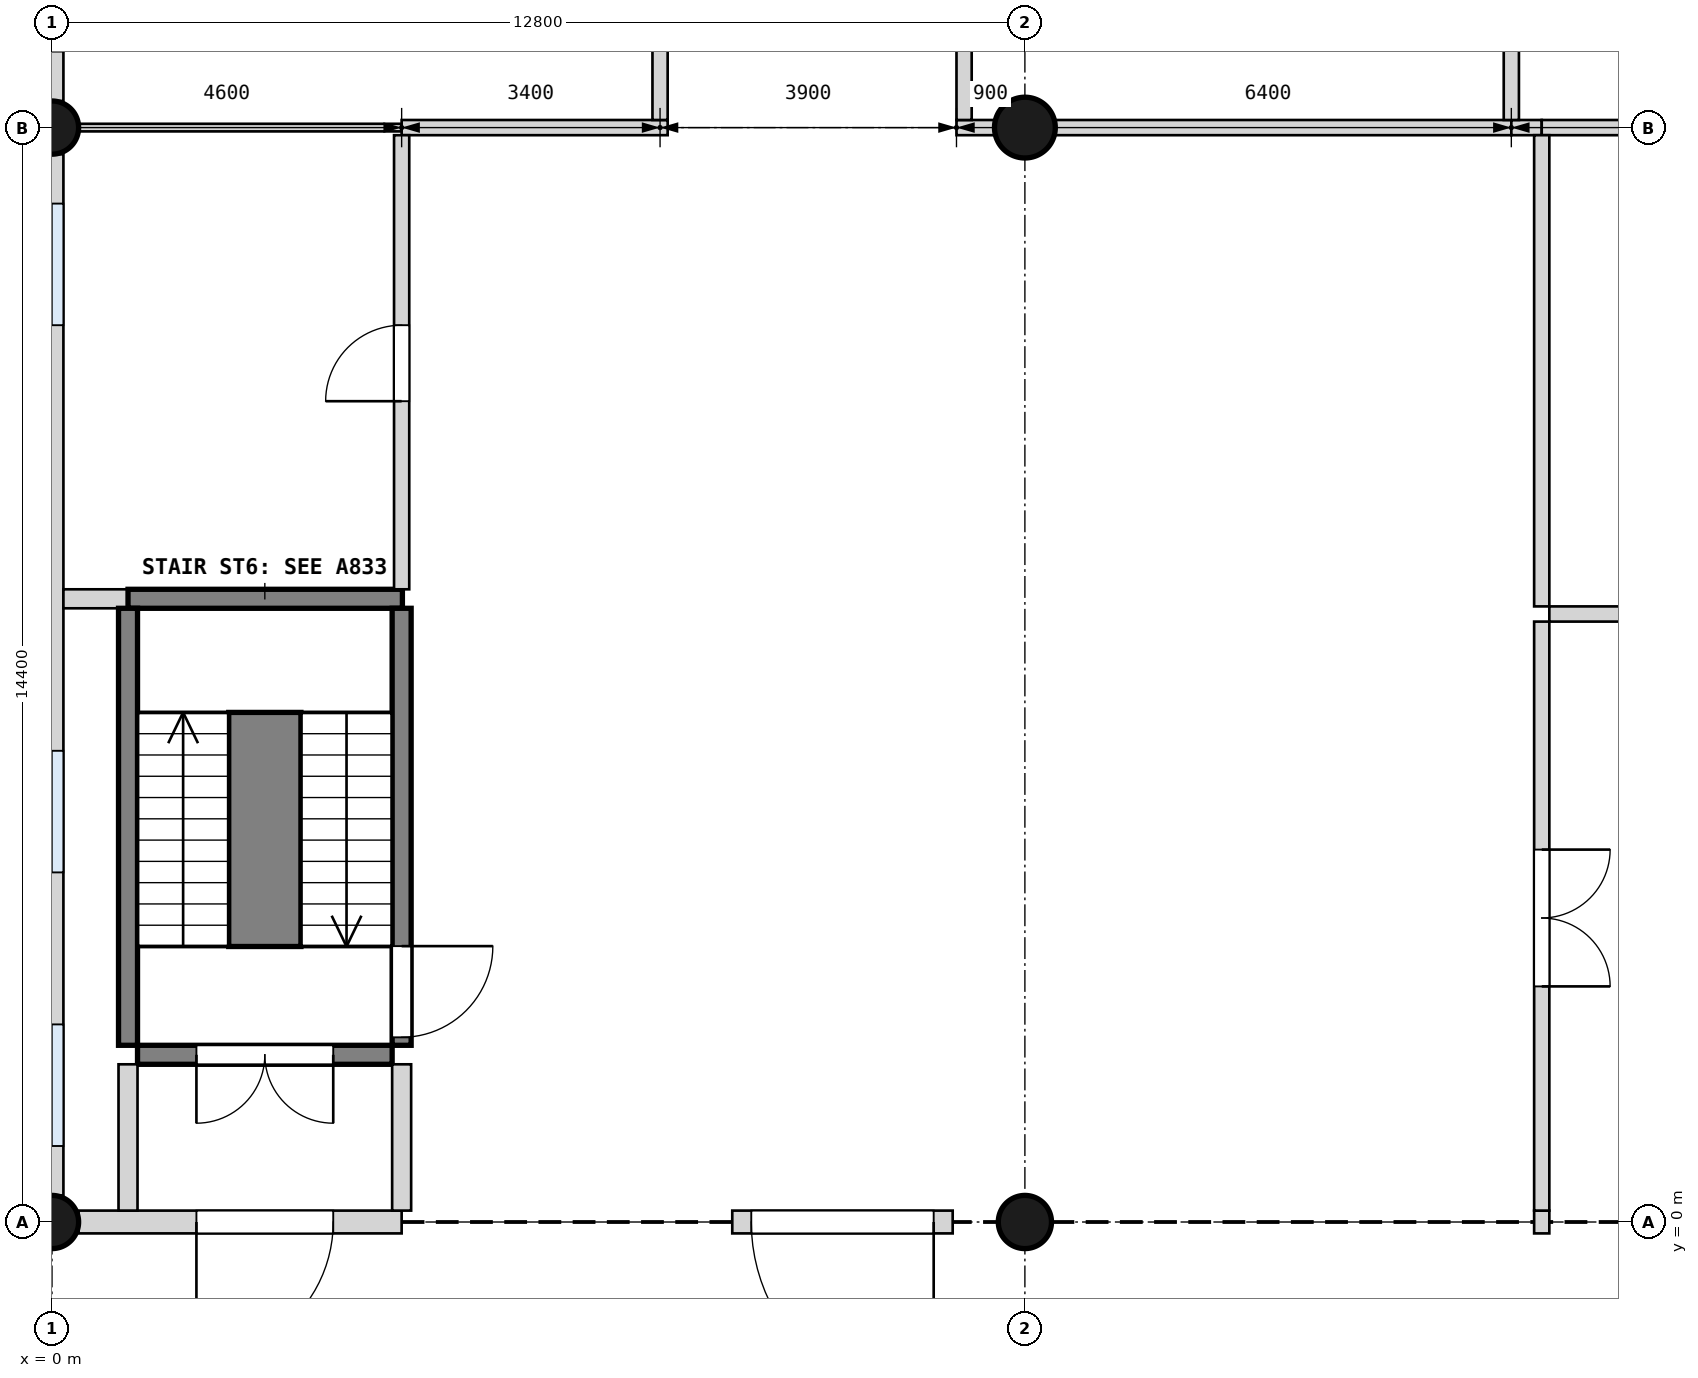
"""IFC4 building model, lengths in metres.
Left out: names, types, materials, properties, quantities, classifications, styles, units other than length and angle.
Written with IfcOpenShell. Run it as: python <this file> out.ifc"""

import sys

from ifc_helpers import new_model, si_unit, direction, frame, frame_2d, origin, origin_2d, place, context, subcontext, project, spatial, rectangle, circle, extrude, element, fill, save


model = new_model("IFC4")
c1 = context("Model", 3, precision=1e-05, world=origin(), true_north=direction((0.0, 1.0)))
c2 = subcontext(c1, "Body", "Model", "MODEL_VIEW")
j1 = project(units=[si_unit("LENGTHUNIT", "METRE"), si_unit("PLANEANGLEUNIT", "RADIAN")], contexts=[c1])
p1 = place(None, origin())
s1 = spatial("IfcSite", under=j1, at=p1, CompositionType="ELEMENT")
p2 = place(p1, origin())
s2 = spatial("IfcBuilding", under=s1, at=p2, CompositionType="ELEMENT")
p3 = place(p2, origin())
s3 = spatial("IfcBuildingStorey", under=s2, at=p3, CompositionType="ELEMENT", Elevation=0.0)
for number, where, z_axis, x_axis in (
    (1, (0.0, 0.0, 0.0), (0.0, 0.0, 1.0), (1.0, 0.0, 0.0)),
    (2, (0.0, 14.4, 0.0), (0.0, 0.0, 1.0), (1.0, 0.0, 0.0)),
    (3, (12.8, 0.0, 0.0), (0.0, 0.0, 1.0), (1.0, 0.0, 0.0)),
):
    element("IfcColumn", number, at=place(p3, frame(where, z_axis=z_axis, x_axis=x_axis)), inside=s3, PredefinedType="COLUMN", context=c2, shape_type="SweptSolid", body=[
        extrude(circle(Radius=0.35, at=origin_2d()), origin(), (0.0, 0.0, 1.0), 4.2),
    ])
p4 = place(p3, frame((12.8, 14.4, 0.0), z_axis=(0.0, 0.0, 1.0), x_axis=(1.0, 0.0, 0.0)))
e4 = element("IfcColumn", 4, at=p4, inside=s3, PredefinedType="COLUMN", context=c2, shape_type="SweptSolid", body=[
    extrude(circle(Radius=0.4, at=origin_2d()), origin(), (0.0, 0.0, 1.0), 4.2),
])
p5 = place(p3, frame((0.35, 0.0, 0.0), z_axis=(0.0, 0.0, 1.0), x_axis=(1.0, 0.0, 0.0)))
e5 = element("IfcWall", 5, at=p5, inside=s3, PredefinedType="SOLIDWALL", context=c2, shape_type="SweptSolid", body=[
    extrude(rectangle(XDim=4.25, YDim=0.3, at=frame_2d((2.125, 0.0))), origin(), (0.0, 0.0, 1.0), 3.0),
])
p6 = place(p5, frame((1.55, 0.0, 0.0)))
e6 = element("IfcOpeningElement", 6, at=p6, cuts=e5, PredefinedType="OPENING", context=c2, shape_type="SweptSolid", body=[
    extrude(rectangle(XDim=1.8, YDim=2.1, at=frame_2d((0.9, 1.05))), frame((0.0, 0.16, 0.0), z_axis=(0.0, -1.0, 0.0), x_axis=(1.0, 0.0, 0.0)), (0.0, 0.0, 1.0), 0.32),
])
p7 = place(p3, frame((8.95, 0.0, 0.0), z_axis=(0.0, 0.0, 1.0), x_axis=(1.0, 0.0, 0.0)))
e7 = element("IfcWall", 7, at=p7, inside=s3, PredefinedType="SOLIDWALL", context=c2, shape_type="SweptSolid", body=[
    extrude(rectangle(XDim=2.9, YDim=0.3, at=frame_2d((1.45, 0.0))), origin(), (0.0, 0.0, 1.0), 3.0),
])
p8 = place(p7, frame((0.25, 0.0, 0.0)))
e8 = element("IfcOpeningElement", 8, at=p8, cuts=e7, PredefinedType="OPENING", context=c2, shape_type="SweptSolid", body=[
    extrude(rectangle(XDim=2.4, YDim=2.4, at=frame_2d((1.2, 1.2))), frame((0.0, 0.16, 0.0), z_axis=(0.0, -1.0, 0.0), x_axis=(1.0, 0.0, 0.0)), (0.0, 0.0, 1.0), 0.32),
])
p9 = place(p3, frame((19.5, 0.0, 0.0), z_axis=(0.0, 0.0, 1.0), x_axis=(1.0, 0.0, 0.0)))
e9 = element("IfcWall", 9, at=p9, inside=s3, PredefinedType="SOLIDWALL", context=c2, shape_type="SweptSolid", body=[
    extrude(rectangle(XDim=0.2, YDim=0.3, at=frame_2d((0.1, 0.0))), origin(), (0.0, 0.0, 1.0), 3.0),
])
p10 = place(p3, frame((0.0, 0.35, 0.0), z_axis=(0.0, 0.0, 1.0), x_axis=(0.0, 1.0, 0.0)))
e10 = element("IfcWall", 10, at=p10, inside=s3, PredefinedType="SOLIDWALL", context=c2, shape_type="SweptSolid", body=[
    extrude(rectangle(XDim=13.7, YDim=0.3, at=frame_2d((6.85, 0.0))), origin(), (0.0, 0.0, 1.0), 3.0),
])
p11 = place(p10, frame((0.65, 0.0, 0.3)))
e11 = element("IfcOpeningElement", 11, at=p11, cuts=e10, PredefinedType="OPENING", context=c2, shape_type="SweptSolid", body=[
    extrude(rectangle(XDim=1.6, YDim=2.4, at=frame_2d((0.8, 1.2))), frame((0.0, 0.16, 0.0), z_axis=(0.0, -1.0, 0.0), x_axis=(1.0, 0.0, 0.0)), (0.0, 0.0, 1.0), 0.32),
])
p12 = place(p10, frame((4.25, 0.0, 0.3)))
e12 = element("IfcOpeningElement", 12, at=p12, cuts=e10, PredefinedType="OPENING", context=c2, shape_type="SweptSolid", body=[
    extrude(rectangle(XDim=1.6, YDim=2.4, at=frame_2d((0.8, 1.2))), frame((0.0, 0.16, 0.0), z_axis=(0.0, -1.0, 0.0), x_axis=(1.0, 0.0, 0.0)), (0.0, 0.0, 1.0), 0.32),
])
p13 = place(p10, frame((11.45, 0.0, 0.3)))
e13 = element("IfcOpeningElement", 13, at=p13, cuts=e10, PredefinedType="OPENING", context=c2, shape_type="SweptSolid", body=[
    extrude(rectangle(XDim=1.6, YDim=2.4, at=frame_2d((0.8, 1.2))), frame((0.0, 0.16, 0.0), z_axis=(0.0, -1.0, 0.0), x_axis=(1.0, 0.0, 0.0)), (0.0, 0.0, 1.0), 0.32),
])
p14 = place(p3, frame((0.0, 14.75, 0.0), z_axis=(0.0, 0.0, 1.0), x_axis=(0.0, 1.0, 0.0)))
e14 = element("IfcWall", 14, at=p14, inside=s3, PredefinedType="SOLIDWALL", context=c2, shape_type="SweptSolid", body=[
    extrude(rectangle(XDim=13.7, YDim=0.3, at=frame_2d((6.85, 0.0))), origin(), (0.0, 0.0, 1.0), 3.0),
])
p15 = place(p14, frame((0.65, 0.0, 0.3)))
e15 = element("IfcOpeningElement", 15, at=p15, cuts=e14, PredefinedType="OPENING", context=c2, shape_type="SweptSolid", body=[
    extrude(rectangle(XDim=1.6, YDim=2.4, at=frame_2d((0.8, 1.2))), frame((0.0, 0.16, 0.0), z_axis=(0.0, -1.0, 0.0), x_axis=(1.0, 0.0, 0.0)), (0.0, 0.0, 1.0), 0.32),
])
p16 = place(p14, frame((4.25, 0.0, 0.3)))
e16 = element("IfcOpeningElement", 16, at=p16, cuts=e14, PredefinedType="OPENING", context=c2, shape_type="SweptSolid", body=[
    extrude(rectangle(XDim=1.6, YDim=2.4, at=frame_2d((0.8, 1.2))), frame((0.0, 0.16, 0.0), z_axis=(0.0, -1.0, 0.0), x_axis=(1.0, 0.0, 0.0)), (0.0, 0.0, 1.0), 0.32),
])
p17 = place(p14, frame((11.45, 0.0, 0.3)))
e17 = element("IfcOpeningElement", 17, at=p17, cuts=e14, PredefinedType="OPENING", context=c2, shape_type="SweptSolid", body=[
    extrude(rectangle(XDim=1.6, YDim=2.4, at=frame_2d((0.8, 1.2))), frame((0.0, 0.16, 0.0), z_axis=(0.0, -1.0, 0.0), x_axis=(1.0, 0.0, 0.0)), (0.0, 0.0, 1.0), 0.32),
])
p18 = place(p3, frame((1.125, 2.2, 0.0), z_axis=(0.0, 0.0, 1.0), x_axis=(1.0, 0.0, 0.0)))
e18 = element("IfcWall", 18, at=p18, inside=s3, PredefinedType="SHEAR", context=c2, shape_type="SweptSolid", body=[
    extrude(rectangle(XDim=3.35, YDim=0.25, at=frame_2d((1.675, 0.0))), origin(), (0.0, 0.0, 1.0), 3.9),
])
p19 = place(p18, frame((0.775, 0.0, 0.0)))
e19 = element("IfcOpeningElement", 19, at=p19, cuts=e18, PredefinedType="OPENING", context=c2, shape_type="SweptSolid", body=[
    extrude(rectangle(XDim=1.8, YDim=2.1, at=frame_2d((0.9, 1.05))), frame((0.0, 0.135, 0.0), z_axis=(0.0, -1.0, 0.0), x_axis=(1.0, 0.0, 0.0)), (0.0, 0.0, 1.0), 0.27),
])
p20 = place(p3, frame((19.7, 8.0, 0.0), z_axis=(0.0, 0.0, 1.0), x_axis=(1.0, 0.0, 0.0)))
e20 = element("IfcWall", 20, at=p20, inside=s3, PredefinedType="PARTITIONING", context=c2, shape_type="SweptSolid", body=[
    extrude(rectangle(XDim=5.75, YDim=0.2, at=frame_2d((2.875, 0.0))), origin(), (0.0, 0.0, 1.0), 3.9),
])
p21 = place(p20, frame((2.4, 0.0, 0.0)))
e21 = element("IfcOpeningElement", 21, at=p21, cuts=e20, PredefinedType="OPENING", context=c2, shape_type="SweptSolid", body=[
    extrude(rectangle(XDim=1.0, YDim=2.1, at=frame_2d((0.5, 1.05))), frame((0.0, 0.11, 0.0), z_axis=(0.0, -1.0, 0.0), x_axis=(1.0, 0.0, 0.0)), (0.0, 0.0, 1.0), 0.22),
])
p22 = place(p3, frame((0.15, 8.2, 0.0), z_axis=(0.0, 0.0, 1.0), x_axis=(1.0, 0.0, 0.0)))
e22 = element("IfcWall", 22, at=p22, inside=s3, PredefinedType="PARTITIONING", context=c2, shape_type="SweptSolid", body=[
    extrude(rectangle(XDim=0.85, YDim=0.25, at=frame_2d((0.425, 0.0))), origin(), (0.0, 0.0, 1.0), 3.9),
])
p23 = place(p3, frame((1.0, 8.2, 0.0), z_axis=(0.0, 0.0, 1.0), x_axis=(1.0, 0.0, 0.0)))
e23 = element("IfcWall", 23, at=p23, inside=s3, PredefinedType="SHEAR", context=c2, shape_type="SweptSolid", body=[
    extrude(rectangle(XDim=3.61, YDim=0.25, at=frame_2d((1.805, 0.0))), origin(), (0.0, 0.0, 1.0), 3.9),
])
p24 = place(p3, frame((0.32, 14.4, 0.0), z_axis=(0.0, 0.0, 1.0), x_axis=(1.0, 0.0, 0.0)))
e24 = element("IfcWall", 24, at=p24, inside=s3, PredefinedType="PARTITIONING", context=c2, shape_type="SweptSolid", body=[
    extrude(rectangle(XDim=4.28, YDim=0.1, at=frame_2d((2.14, 0.0))), origin(), (0.0, 0.0, 1.0), 3.1),
])
p25 = place(p3, frame((4.6, 14.4, 0.0), z_axis=(0.0, 0.0, 1.0), x_axis=(1.0, 0.0, 0.0)))
e25 = element("IfcWall", 25, at=p25, inside=s3, PredefinedType="PARTITIONING", context=c2, shape_type="SweptSolid", body=[
    extrude(rectangle(XDim=3.5, YDim=0.2, at=frame_2d((1.75, 0.0))), origin(), (0.0, 0.0, 1.0), 3.1),
])
p26 = place(p3, frame((11.9, 14.4, 0.0), z_axis=(0.0, 0.0, 1.0), x_axis=(1.0, 0.0, 0.0)))
e26 = element("IfcWall", 26, at=p26, inside=s3, PredefinedType="PARTITIONING", context=c2, shape_type="SweptSolid", body=[
    extrude(rectangle(XDim=0.5, YDim=0.2, at=frame_2d((0.25, 0.0))), origin(), (0.0, 0.0, 1.0), 3.1),
])
p27 = place(p3, frame((13.2, 14.4, 0.0), z_axis=(0.0, 0.0, 1.0), x_axis=(1.0, 0.0, 0.0)))
e27 = element("IfcWall", 27, at=p27, inside=s3, PredefinedType="PARTITIONING", context=c2, shape_type="SweptSolid", body=[
    extrude(rectangle(XDim=6.0, YDim=0.2, at=frame_2d((3.0, 0.0))), origin(), (0.0, 0.0, 1.0), 3.1),
])
p28 = place(p3, frame((19.2, 14.4, 0.0), z_axis=(0.0, 0.0, 1.0), x_axis=(1.0, 0.0, 0.0)))
e28 = element("IfcWall", 28, at=p28, inside=s3, PredefinedType="PARTITIONING", context=c2, shape_type="SweptSolid", body=[
    extrude(rectangle(XDim=0.4, YDim=0.2, at=frame_2d((0.2, 0.0))), origin(), (0.0, 0.0, 1.0), 3.1),
])
p29 = place(p3, frame((19.6, 14.4, 0.0), z_axis=(0.0, 0.0, 1.0), x_axis=(1.0, 0.0, 0.0)))
e29 = element("IfcWall", 29, at=p29, inside=s3, PredefinedType="PARTITIONING", context=c2, shape_type="SweptSolid", body=[
    extrude(rectangle(XDim=5.68, YDim=0.2, at=frame_2d((2.84, 0.0))), origin(), (0.0, 0.0, 1.0), 3.1),
])
p30 = place(p3, frame((1.0, 0.15, 0.0), z_axis=(0.0, 0.0, 1.0), x_axis=(0.0, 1.0, 0.0)))
e30 = element("IfcWall", 30, at=p30, inside=s3, PredefinedType="PARTITIONING", context=c2, shape_type="SweptSolid", body=[
    extrude(rectangle(XDim=1.925, YDim=0.25, at=frame_2d((0.962, 0.0))), origin(), (0.0, 0.0, 1.0), 3.9),
])
p31 = place(p3, frame((1.0, 2.325, 0.0), z_axis=(0.0, 0.0, 1.0), x_axis=(0.0, 1.0, 0.0)))
e31 = element("IfcWall", 31, at=p31, inside=s3, PredefinedType="SHEAR", context=c2, shape_type="SweptSolid", body=[
    extrude(rectangle(XDim=5.75, YDim=0.25, at=frame_2d((2.875, 0.0))), origin(), (0.0, 0.0, 1.0), 3.9),
])
p32 = place(p3, frame((4.6, 0.15, 0.0), z_axis=(0.0, 0.0, 1.0), x_axis=(0.0, 1.0, 0.0)))
e32 = element("IfcWall", 32, at=p32, inside=s3, PredefinedType="PARTITIONING", context=c2, shape_type="SweptSolid", body=[
    extrude(rectangle(XDim=1.925, YDim=0.25, at=frame_2d((0.962, 0.0))), origin(), (0.0, 0.0, 1.0), 3.9),
])
p33 = place(p3, frame((4.6, 2.325, 0.0), z_axis=(0.0, 0.0, 1.0), x_axis=(0.0, 1.0, 0.0)))
e33 = element("IfcWall", 33, at=p33, inside=s3, PredefinedType="SHEAR", context=c2, shape_type="SweptSolid", body=[
    extrude(rectangle(XDim=5.75, YDim=0.25, at=frame_2d((2.875, 0.0))), origin(), (0.0, 0.0, 1.0), 3.9),
])
p34 = place(p33, frame((0.105, 0.0, 0.0)))
e34 = element("IfcOpeningElement", 34, at=p34, cuts=e33, PredefinedType="OPENING", context=c2, shape_type="SweptSolid", body=[
    extrude(rectangle(XDim=1.2, YDim=2.1, at=frame_2d((0.6, 1.05))), frame((0.0, 0.135, 0.0), z_axis=(0.0, -1.0, 0.0), x_axis=(1.0, 0.0, 0.0)), (0.0, 0.0, 1.0), 0.27),
])
p35 = place(p3, frame((4.6, 8.325, 0.0), z_axis=(0.0, 0.0, 1.0), x_axis=(0.0, 1.0, 0.0)))
e35 = element("IfcWall", 35, at=p35, inside=s3, PredefinedType="PARTITIONING", context=c2, shape_type="SweptSolid", body=[
    extrude(rectangle(XDim=5.975, YDim=0.2, at=frame_2d((2.988, 0.0))), origin(), (0.0, 0.0, 1.0), 3.9),
])
p36 = place(p35, frame((2.475, 0.0, 0.0)))
e36 = element("IfcOpeningElement", 36, at=p36, cuts=e35, PredefinedType="OPENING", context=c2, shape_type="SweptSolid", body=[
    extrude(rectangle(XDim=1.0, YDim=2.1, at=frame_2d((0.5, 1.05))), frame((0.0, 0.11, 0.0), z_axis=(0.0, -1.0, 0.0), x_axis=(1.0, 0.0, 0.0)), (0.0, 0.0, 1.0), 0.22),
])
p37 = place(p3, frame((8.0, 14.5, 0.0), z_axis=(0.0, 0.0, 1.0), x_axis=(0.0, 1.0, 0.0)))
e37 = element("IfcWall", 37, at=p37, inside=s3, PredefinedType="PARTITIONING", context=c2, shape_type="SweptSolid", body=[
    extrude(rectangle(XDim=7.8, YDim=0.2, at=frame_2d((3.9, 0.0))), origin(), (0.0, 0.0, 1.0), 3.9),
])
p38 = place(p37, frame((3.4, 0.0, 0.0)))
e38 = element("IfcOpeningElement", 38, at=p38, cuts=e37, PredefinedType="OPENING", context=c2, shape_type="SweptSolid", body=[
    extrude(rectangle(XDim=1.0, YDim=2.1, at=frame_2d((0.5, 1.05))), frame((0.0, 0.11, 0.0), z_axis=(0.0, -1.0, 0.0), x_axis=(1.0, 0.0, 0.0)), (0.0, 0.0, 1.0), 0.22),
])
p39 = place(p3, frame((12.0, 14.5, 0.0), z_axis=(0.0, 0.0, 1.0), x_axis=(0.0, 1.0, 0.0)))
e39 = element("IfcWall", 39, at=p39, inside=s3, PredefinedType="PARTITIONING", context=c2, shape_type="SweptSolid", body=[
    extrude(rectangle(XDim=7.812, YDim=0.2, at=frame_2d((3.906, 0.0))), origin(), (0.0, 0.0, 1.0), 3.9),
])
p40 = place(p3, frame((19.2, 14.5, 0.0), z_axis=(0.0, 0.0, 1.0), x_axis=(0.0, 1.0, 0.0)))
e40 = element("IfcWall", 40, at=p40, inside=s3, PredefinedType="PARTITIONING", context=c2, shape_type="SweptSolid", body=[
    extrude(rectangle(XDim=7.812, YDim=0.2, at=frame_2d((3.906, 0.0))), origin(), (0.0, 0.0, 1.0), 3.0),
])
p41 = place(p40, frame((3.4, 0.0, 0.0)))
e41 = element("IfcOpeningElement", 41, at=p41, cuts=e40, PredefinedType="OPENING", context=c2, shape_type="SweptSolid", body=[
    extrude(rectangle(XDim=1.0, YDim=2.1, at=frame_2d((0.5, 1.05))), frame((0.0, 0.11, 0.0), z_axis=(0.0, -1.0, 0.0), x_axis=(1.0, 0.0, 0.0)), (0.0, 0.0, 1.0), 0.22),
])
p42 = place(p3, frame((19.6, 0.15, 0.0), z_axis=(0.0, 0.0, 1.0), x_axis=(0.0, 1.0, 0.0)))
e42 = element("IfcWall", 42, at=p42, inside=s3, PredefinedType="PARTITIONING", context=c2, shape_type="SweptSolid", body=[
    extrude(rectangle(XDim=7.75, YDim=0.2, at=frame_2d((3.875, 0.0))), origin(), (0.0, 0.0, 1.0), 3.9),
])
p43 = place(p42, frame((2.95, 0.0, 0.0)))
e43 = element("IfcOpeningElement", 43, at=p43, cuts=e42, PredefinedType="OPENING", context=c2, shape_type="SweptSolid", body=[
    extrude(rectangle(XDim=1.8, YDim=2.1, at=frame_2d((0.9, 1.05))), frame((0.0, 0.11, 0.0), z_axis=(0.0, -1.0, 0.0), x_axis=(1.0, 0.0, 0.0)), (0.0, 0.0, 1.0), 0.22),
])
p44 = place(p3, frame((19.6, 8.1, 0.0), z_axis=(0.0, 0.0, 1.0), x_axis=(0.0, 1.0, 0.0)))
e44 = element("IfcWall", 44, at=p44, inside=s3, PredefinedType="PARTITIONING", context=c2, shape_type="SweptSolid", body=[
    extrude(rectangle(XDim=6.2, YDim=0.2, at=frame_2d((3.1, 0.0))), origin(), (0.0, 0.0, 1.0), 3.9),
])
p45 = place(p3, frame((2.8, 3.625, 0.0), z_axis=(0.0, 0.0, 1.0), x_axis=(0.0, 1.0, 0.0)))
e45 = element("IfcWall", 45, at=p45, inside=s3, PredefinedType="SHEAR", context=c2, shape_type="SweptSolid", body=[
    extrude(rectangle(XDim=3.08, YDim=0.95, at=frame_2d((1.54, 0.0))), origin(), (0.0, 0.0, 1.0), 4.2),
])
p46 = place(p6, frame((1.8, 0.0, 0.0), z_axis=(0.0, 0.0, 1.0), x_axis=(-1.0, 0.0, 0.0)))
e46 = element("IfcDoor", 46, at=p46, inside=s3, OperationType="SINGLE_SWING_RIGHT", PredefinedType="DOOR", context=c2, shape_type="SweptSolid", body=[
    extrude(rectangle(XDim=1.8, YDim=2.1, at=frame_2d((0.9, 1.05))), frame((0.0, 0.025, 0.0), z_axis=(0.0, -1.0, 0.0), x_axis=(1.0, 0.0, 0.0)), (0.0, 0.0, 1.0), 0.05),
])
fill(e6, e46)
p47 = place(p8, frame((2.4, 0.0, 0.0), z_axis=(0.0, 0.0, 1.0), x_axis=(-1.0, 0.0, 0.0)))
e47 = element("IfcDoor", 47, at=p47, inside=s3, OperationType="SINGLE_SWING_LEFT", PredefinedType="DOOR", context=c2, shape_type="SweptSolid", body=[
    extrude(rectangle(XDim=2.4, YDim=2.4, at=frame_2d((1.2, 1.2))), frame((0.0, 0.025, 0.0), z_axis=(0.0, -1.0, 0.0), x_axis=(1.0, 0.0, 0.0)), (0.0, 0.0, 1.0), 0.05),
])
fill(e8, e47)
p48 = place(p34, frame((1.2, 0.0, 0.0), z_axis=(0.0, 0.0, 1.0), x_axis=(-1.0, 0.0, 0.0)))
e48 = element("IfcDoor", 48, at=p48, inside=s3, OperationType="SINGLE_SWING_LEFT", PredefinedType="DOOR", context=c2, shape_type="SweptSolid", body=[
    extrude(rectangle(XDim=1.2, YDim=2.1, at=frame_2d((0.6, 1.05))), frame((0.0, 0.025, 0.0), z_axis=(0.0, -1.0, 0.0), x_axis=(1.0, 0.0, 0.0)), (0.0, 0.0, 1.0), 0.05),
])
fill(e34, e48)
p49 = place(p19, frame((1.8, 0.0, 0.0), z_axis=(0.0, 0.0, 1.0), x_axis=(-1.0, 0.0, 0.0)))
e49 = element("IfcDoor", 49, at=p49, inside=s3, OperationType="DOUBLE_DOOR_SINGLE_SWING", PredefinedType="DOOR", context=c2, shape_type="SweptSolid", body=[
    extrude(rectangle(XDim=1.8, YDim=2.1, at=frame_2d((0.9, 1.05))), frame((0.0, 0.025, 0.0), z_axis=(0.0, -1.0, 0.0), x_axis=(1.0, 0.0, 0.0)), (0.0, 0.0, 1.0), 0.05),
])
fill(e19, e49)
p50 = place(p36, origin())
e50 = element("IfcDoor", 50, at=p50, inside=s3, OperationType="SINGLE_SWING_LEFT", PredefinedType="DOOR", context=c2, shape_type="SweptSolid", body=[
    extrude(rectangle(XDim=1.0, YDim=2.1, at=frame_2d((0.5, 1.05))), frame((0.0, 0.025, 0.0), z_axis=(0.0, -1.0, 0.0), x_axis=(1.0, 0.0, 0.0)), (0.0, 0.0, 1.0), 0.05),
])
fill(e36, e50)
p51 = place(p43, frame((1.8, 0.0, 0.0), z_axis=(0.0, 0.0, 1.0), x_axis=(-1.0, 0.0, 0.0)))
e51 = element("IfcDoor", 51, at=p51, inside=s3, OperationType="DOUBLE_DOOR_SINGLE_SWING", PredefinedType="DOOR", context=c2, shape_type="SweptSolid", body=[
    extrude(rectangle(XDim=1.8, YDim=2.1, at=frame_2d((0.9, 1.05))), frame((0.0, 0.025, 0.0), z_axis=(0.0, -1.0, 0.0), x_axis=(1.0, 0.0, 0.0)), (0.0, 0.0, 1.0), 0.05),
])
fill(e43, e51)
p52 = place(p11, origin())
e52 = element("IfcWindow", 52, at=p52, inside=s3, PartitioningType="SINGLE_PANEL", PredefinedType="WINDOW", context=c2, shape_type="SweptSolid", body=[
    extrude(rectangle(XDim=1.6, YDim=2.4, at=frame_2d((0.8, 1.2))), frame((0.0, 0.03, 0.0), z_axis=(0.0, -1.0, 0.0), x_axis=(1.0, 0.0, 0.0)), (0.0, 0.0, 1.0), 0.06),
])
fill(e11, e52)
p53 = place(p12, origin())
e53 = element("IfcWindow", 53, at=p53, inside=s3, PartitioningType="SINGLE_PANEL", PredefinedType="WINDOW", context=c2, shape_type="SweptSolid", body=[
    extrude(rectangle(XDim=1.6, YDim=2.4, at=frame_2d((0.8, 1.2))), frame((0.0, 0.03, 0.0), z_axis=(0.0, -1.0, 0.0), x_axis=(1.0, 0.0, 0.0)), (0.0, 0.0, 1.0), 0.06),
])
fill(e12, e53)
p54 = place(p13, origin())
e54 = element("IfcWindow", 54, at=p54, inside=s3, PartitioningType="SINGLE_PANEL", PredefinedType="WINDOW", context=c2, shape_type="SweptSolid", body=[
    extrude(rectangle(XDim=1.6, YDim=2.4, at=frame_2d((0.8, 1.2))), frame((0.0, 0.03, 0.0), z_axis=(0.0, -1.0, 0.0), x_axis=(1.0, 0.0, 0.0)), (0.0, 0.0, 1.0), 0.06),
])
fill(e13, e54)
save(model, sys.argv[1])
